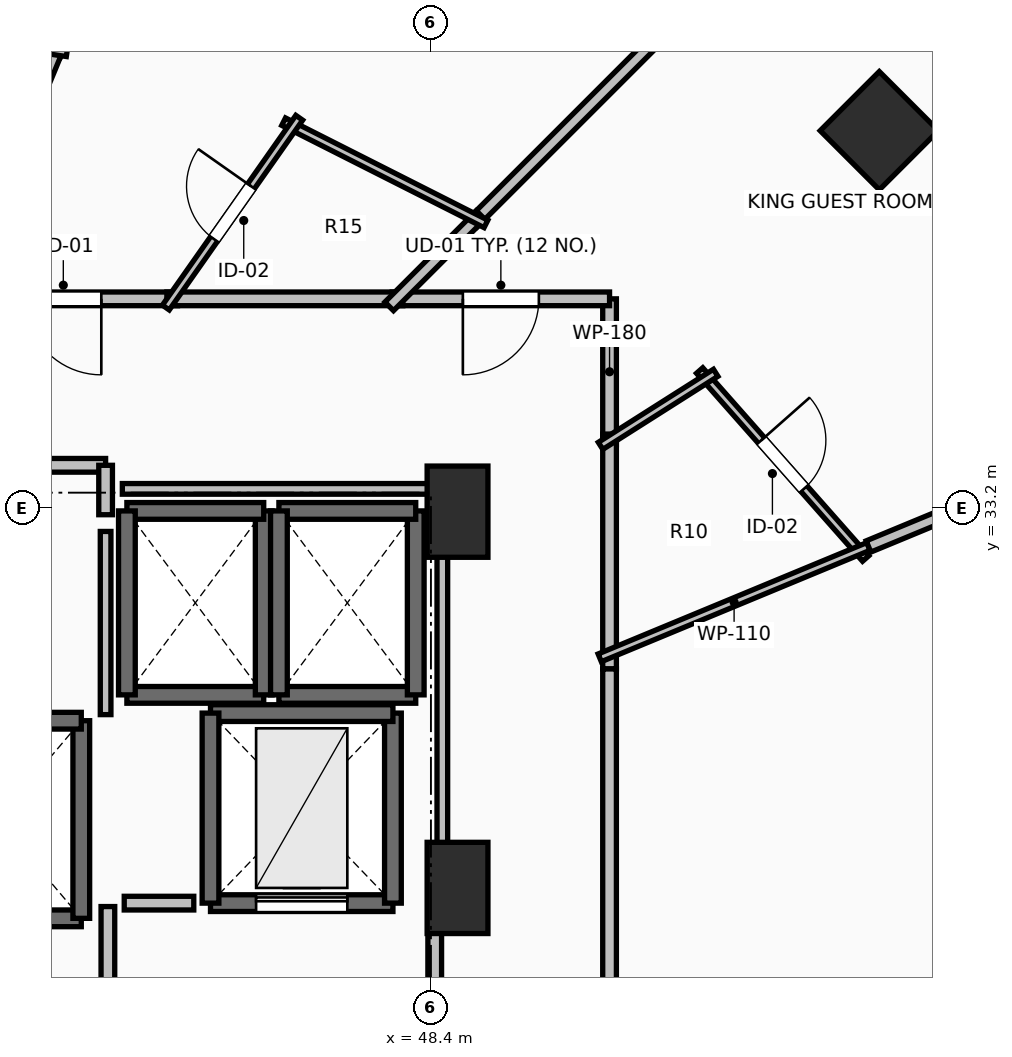
"""IFC4 building model, lengths in metres.
Left out: names, types, materials, properties, quantities, classifications, styles, units other than length and angle.
Written with IfcOpenShell. Run it as: python <this file> out.ifc"""

import sys

from ifc_helpers import new_model, si_unit, direction, frame, frame_2d, origin, origin_2d, place, context, subcontext, project, spatial, rectangle, extrude, element, fill, save


model = new_model("IFC4")
c1 = context("Model", 3, precision=1e-05, world=origin(), true_north=direction((0.0, 1.0)))
c2 = subcontext(c1, "Body", "Model", "MODEL_VIEW")
j1 = project(units=[si_unit("LENGTHUNIT", "METRE"), si_unit("PLANEANGLEUNIT", "RADIAN")], contexts=[c1])
p1 = place(None, origin())
s1 = spatial("IfcSite", under=j1, at=p1, CompositionType="ELEMENT")
p2 = place(p1, origin())
s2 = spatial("IfcBuilding", under=s1, at=p2, CompositionType="ELEMENT")
p3 = place(p2, frame((0.0, 0.0, 103.3)))
s3 = spatial("IfcBuildingStorey", under=s2, at=p3, CompositionType="ELEMENT", Elevation=103.3)
p4 = place(p3, frame((54.299, 38.162, 0.0), z_axis=(0.0, 0.0, 1.0), x_axis=(0.707106781187, 0.707106781187, 0.0)))
e1 = element("IfcColumn", 1, at=p4, inside=s3, PredefinedType="COLUMN", context=c2, shape_type="SweptSolid", body=[
    extrude(rectangle(XDim=1.1, YDim=1.1, at=origin_2d()), origin(), (0.0, 0.0, 1.0), 3.5),
])
for number, where, z_axis, x_axis in (
    (2, (48.75, 33.15, 0.0), (0.0, 0.0, 1.0), (1.0, 0.0, 0.0)),
    (3, (48.75, 28.2, 0.0), (0.0, 0.0, 1.0), (1.0, 0.0, 0.0)),
):
    element("IfcColumn", number, at=place(p3, frame(where, z_axis=z_axis, x_axis=x_axis)), inside=s3, PredefinedType="PILASTER", context=c2, shape_type="SweptSolid", body=[
        extrude(rectangle(XDim=0.8, YDim=1.2, at=origin_2d()), origin(), (0.0, 0.0, 1.0), 3.5),
    ])
p5 = place(p3, frame((41.6, 27.8, 0.0), z_axis=(0.0, 0.0, 1.0), x_axis=(1.0, 0.0, 0.0)))
e4 = element("IfcWall", 4, at=p5, inside=s3, PredefinedType="SOLIDWALL", context=c2, shape_type="SweptSolid", body=[
    extrude(rectangle(XDim=2.2, YDim=0.22, at=frame_2d((1.1, 0.0))), origin(), (0.0, 0.0, 1.0), 3.24),
])
p6 = place(p3, frame((43.8, 27.8, 0.0), z_axis=(0.0, 0.0, 1.0), x_axis=(0.0, 1.0, 0.0)))
e5 = element("IfcWall", 5, at=p6, inside=s3, PredefinedType="SOLIDWALL", context=c2, shape_type="SweptSolid", body=[
    extrude(rectangle(XDim=2.6, YDim=0.22, at=frame_2d((1.3, 0.0))), origin(), (0.0, 0.0, 1.0), 3.24),
])
p7 = place(p3, frame((43.8, 30.4, 0.0), z_axis=(0.0, 0.0, 1.0), x_axis=(-1.0, 0.0, 0.0)))
e6 = element("IfcWall", 6, at=p7, inside=s3, PredefinedType="SOLIDWALL", context=c2, shape_type="SweptSolid", body=[
    extrude(rectangle(XDim=2.2, YDim=0.22, at=frame_2d((1.1, 0.0))), origin(), (0.0, 0.0, 1.0), 3.24),
])
p8 = place(p3, frame((44.4, 30.74, 0.0), z_axis=(0.0, 0.0, 1.0), x_axis=(1.0, 0.0, 0.0)))
e7 = element("IfcWall", 7, at=p8, inside=s3, PredefinedType="SOLIDWALL", context=c2, shape_type="SweptSolid", body=[
    extrude(rectangle(XDim=1.8, YDim=0.22, at=frame_2d((0.9, 0.0))), origin(), (0.0, 0.0, 1.0), 3.24),
])
p9 = place(p3, frame((46.2, 30.74, 0.0), z_axis=(0.0, 0.0, 1.0), x_axis=(0.0, 1.0, 0.0)))
e8 = element("IfcWall", 8, at=p9, inside=s3, PredefinedType="SOLIDWALL", context=c2, shape_type="SweptSolid", body=[
    extrude(rectangle(XDim=2.42, YDim=0.22, at=frame_2d((1.21, 0.0))), origin(), (0.0, 0.0, 1.0), 3.24),
])
p10 = place(p3, frame((46.2, 33.16, 0.0), z_axis=(0.0, 0.0, 1.0), x_axis=(-1.0, 0.0, 0.0)))
e9 = element("IfcWall", 9, at=p10, inside=s3, PredefinedType="SOLIDWALL", context=c2, shape_type="SweptSolid", body=[
    extrude(rectangle(XDim=1.8, YDim=0.22, at=frame_2d((0.9, 0.0))), origin(), (0.0, 0.0, 1.0), 3.24),
])
p11 = place(p3, frame((44.4, 33.16, 0.0), z_axis=(0.0, 0.0, 1.0), x_axis=(0.0, -1.0, 0.0)))
e10 = element("IfcWall", 10, at=p11, inside=s3, PredefinedType="SOLIDWALL", context=c2, shape_type="SweptSolid", body=[
    extrude(rectangle(XDim=2.42, YDim=0.22, at=frame_2d((1.21, 0.0))), origin(), (0.0, 0.0, 1.0), 3.24),
])
p12 = place(p3, frame((46.4, 30.74, 0.0), z_axis=(0.0, 0.0, 1.0), x_axis=(1.0, 0.0, 0.0)))
e11 = element("IfcWall", 11, at=p12, inside=s3, PredefinedType="SOLIDWALL", context=c2, shape_type="SweptSolid", body=[
    extrude(rectangle(XDim=1.8, YDim=0.22, at=frame_2d((0.9, 0.0))), origin(), (0.0, 0.0, 1.0), 3.24),
])
p13 = place(p3, frame((48.2, 30.74, 0.0), z_axis=(0.0, 0.0, 1.0), x_axis=(0.0, 1.0, 0.0)))
e12 = element("IfcWall", 12, at=p13, inside=s3, PredefinedType="SOLIDWALL", context=c2, shape_type="SweptSolid", body=[
    extrude(rectangle(XDim=2.42, YDim=0.22, at=frame_2d((1.21, 0.0))), origin(), (0.0, 0.0, 1.0), 3.24),
])
p14 = place(p3, frame((48.2, 33.16, 0.0), z_axis=(0.0, 0.0, 1.0), x_axis=(-1.0, 0.0, 0.0)))
e13 = element("IfcWall", 13, at=p14, inside=s3, PredefinedType="SOLIDWALL", context=c2, shape_type="SweptSolid", body=[
    extrude(rectangle(XDim=1.8, YDim=0.22, at=frame_2d((0.9, 0.0))), origin(), (0.0, 0.0, 1.0), 3.24),
])
p15 = place(p3, frame((46.4, 33.16, 0.0), z_axis=(0.0, 0.0, 1.0), x_axis=(0.0, -1.0, 0.0)))
e14 = element("IfcWall", 14, at=p15, inside=s3, PredefinedType="SOLIDWALL", context=c2, shape_type="SweptSolid", body=[
    extrude(rectangle(XDim=2.42, YDim=0.22, at=frame_2d((1.21, 0.0))), origin(), (0.0, 0.0, 1.0), 3.24),
])
p16 = place(p3, frame((45.5, 28.0, 0.0), z_axis=(0.0, 0.0, 1.0), x_axis=(1.0, 0.0, 0.0)))
e15 = element("IfcWall", 15, at=p16, inside=s3, PredefinedType="SHEAR", context=c2, shape_type="SweptSolid", body=[
    extrude(rectangle(XDim=2.4, YDim=0.22, at=frame_2d((1.2, 0.0))), origin(), (0.0, 0.0, 1.0), 3.24),
])
p17 = place(p16, frame((0.6, 0.0, 0.0)))
e16 = element("IfcOpeningElement", 16, at=p17, cuts=e15, PredefinedType="OPENING", context=c2, shape_type="SweptSolid", body=[
    extrude(rectangle(XDim=1.2, YDim=2.2, at=frame_2d((0.6, 1.1))), frame((0.0, 0.125, 0.0), z_axis=(0.0, -1.0, 0.0), x_axis=(1.0, 0.0, 0.0)), (0.0, 0.0, 1.0), 0.25),
])
p18 = place(p3, frame((47.9, 28.0, 0.0), z_axis=(0.0, 0.0, 1.0), x_axis=(0.0, 1.0, 0.0)))
e17 = element("IfcWall", 17, at=p18, inside=s3, PredefinedType="SHEAR", context=c2, shape_type="SweptSolid", body=[
    extrude(rectangle(XDim=2.5, YDim=0.22, at=frame_2d((1.25, 0.0))), origin(), (0.0, 0.0, 1.0), 3.24),
])
p19 = place(p3, frame((47.9, 30.5, 0.0), z_axis=(0.0, 0.0, 1.0), x_axis=(-1.0, 0.0, 0.0)))
e18 = element("IfcWall", 18, at=p19, inside=s3, PredefinedType="SHEAR", context=c2, shape_type="SweptSolid", body=[
    extrude(rectangle(XDim=2.4, YDim=0.22, at=frame_2d((1.2, 0.0))), origin(), (0.0, 0.0, 1.0), 3.24),
])
p20 = place(p3, frame((45.5, 30.5, 0.0), z_axis=(0.0, 0.0, 1.0), x_axis=(0.0, -1.0, 0.0)))
e19 = element("IfcWall", 19, at=p20, inside=s3, PredefinedType="SHEAR", context=c2, shape_type="SweptSolid", body=[
    extrude(rectangle(XDim=2.5, YDim=0.22, at=frame_2d((1.25, 0.0))), origin(), (0.0, 0.0, 1.0), 3.24),
])
p21 = place(p3, frame((44.15, 27.955, 0.0), z_axis=(0.0, 0.0, 1.0), x_axis=(0.0, -1.0, 0.0)))
e20 = element("IfcWall", 20, at=p21, inside=s3, PredefinedType="PARTITIONING", context=c2, shape_type="SweptSolid", body=[
    extrude(rectangle(XDim=3.91, YDim=0.18, at=frame_2d((1.955, 0.0))), origin(), (0.0, 0.0, 1.0), 3.24),
])
p22 = place(p21, frame((1.355, 0.0, 0.0)))
e21 = element("IfcOpeningElement", 21, at=p22, cuts=e20, PredefinedType="OPENING", context=c2, shape_type="SweptSolid", body=[
    extrude(rectangle(XDim=1.2, YDim=2.15, at=frame_2d((0.6, 1.075))), frame((0.0, 0.105, 0.0), z_axis=(0.0, -1.0, 0.0), x_axis=(1.0, 0.0, 0.0)), (0.0, 0.0, 1.0), 0.21),
])
p23 = place(p3, frame((48.45, 23.95, 0.0), z_axis=(0.0, 0.0, 1.0), x_axis=(0.0, 1.0, 0.0)))
e22 = element("IfcWall", 22, at=p23, inside=s3, PredefinedType="PARTITIONING", context=c2, shape_type="SweptSolid", body=[
    extrude(rectangle(XDim=4.05, YDim=0.18, at=frame_2d((2.025, 0.0))), origin(), (0.0, 0.0, 1.0), 3.24),
])
p24 = place(p23, frame((1.425, 0.0, 0.0)))
e23 = element("IfcOpeningElement", 23, at=p24, cuts=e22, PredefinedType="OPENING", context=c2, shape_type="SweptSolid", body=[
    extrude(rectangle(XDim=1.2, YDim=2.15, at=frame_2d((0.6, 1.075))), frame((0.0, 0.105, 0.0), z_axis=(0.0, -1.0, 0.0), x_axis=(1.0, 0.0, 0.0)), (0.0, 0.0, 1.0), 0.21),
])
p25 = place(p3, frame((44.12, 33.76, 0.0), z_axis=(0.0, 0.0, 1.0), x_axis=(-1.0, 0.0, 0.0)))
e24 = element("IfcWall", 24, at=p25, inside=s3, PredefinedType="PARTITIONING", context=c2, shape_type="SweptSolid", body=[
    extrude(rectangle(XDim=2.53, YDim=0.18, at=frame_2d((1.265, 0.0))), origin(), (0.0, 0.0, 1.0), 3.24),
])
p26 = place(p25, frame((0.84, 0.0, 0.0)))
e25 = element("IfcOpeningElement", 25, at=p26, cuts=e24, PredefinedType="OPENING", context=c2, shape_type="SweptSolid", body=[
    extrude(rectangle(XDim=0.85, YDim=2.1, at=frame_2d((0.425, 1.05))), frame((0.0, 0.105, 0.0), z_axis=(0.0, -1.0, 0.0), x_axis=(1.0, 0.0, 0.0)), (0.0, 0.0, 1.0), 0.21),
])
p27 = place(p3, frame((44.12, 33.11, 0.0), z_axis=(0.0, 0.0, 1.0), x_axis=(0.0, 1.0, 0.0)))
e26 = element("IfcWall", 26, at=p27, inside=s3, PredefinedType="PARTITIONING", context=c2, shape_type="SweptSolid", body=[
    extrude(rectangle(XDim=0.65, YDim=0.18, at=frame_2d((0.325, 0.0))), origin(), (0.0, 0.0, 1.0), 3.24),
])
p28 = place(p3, frame((50.75, 34.031, 0.0), z_axis=(0.0, 0.0, 1.0), x_axis=(0.0, 1.0, 0.0)))
e27 = element("IfcWall", 27, at=p28, inside=s3, PredefinedType="PARTITIONING", context=c2, shape_type="SweptSolid", body=[
    extrude(rectangle(XDim=1.919, YDim=0.18, at=frame_2d((0.959, 0.0))), origin(), (0.0, 0.0, 1.0), 2.432),
])
p29 = place(p3, frame((50.75, 35.95, 0.0), z_axis=(0.0, 0.0, 1.0), x_axis=(-1.0, 0.0, 0.0)))
e28 = element("IfcWall", 28, at=p29, inside=s3, PredefinedType="PARTITIONING", context=c2, shape_type="SweptSolid", body=[
    extrude(rectangle(XDim=2.86, YDim=0.18, at=frame_2d((1.43, 0.0))), origin(), (0.0, 0.0, 1.0), 2.432),
])
p30 = place(p29, frame((0.93, 0.0, 0.0)))
e29 = element("IfcOpeningElement", 29, at=p30, cuts=e28, PredefinedType="OPENING", context=c2, shape_type="SweptSolid", body=[
    extrude(rectangle(XDim=1.0, YDim=2.15, at=frame_2d((0.5, 1.075))), frame((0.0, 0.105, 0.0), z_axis=(0.0, -1.0, 0.0), x_axis=(1.0, 0.0, 0.0)), (0.0, 0.0, 1.0), 0.21),
])
p31 = place(p3, frame((50.75, 31.081, 0.0), z_axis=(0.0, 0.0, 1.0), x_axis=(0.0, 1.0, 0.0)))
e30 = element("IfcWall", 30, at=p31, inside=s3, PredefinedType="PARTITIONING", context=c2, shape_type="SweptSolid", body=[
    extrude(rectangle(XDim=3.09, YDim=0.18, at=frame_2d((1.545, 0.0))), origin(), (0.0, 0.0, 1.0), 2.432),
])
p32 = place(p3, frame((45.066, 35.95, 0.0), z_axis=(0.0, 0.0, 1.0), x_axis=(-1.0, 0.0, 0.0)))
e31 = element("IfcWall", 31, at=p32, inside=s3, PredefinedType="PARTITIONING", context=c2, shape_type="SweptSolid", body=[
    extrude(rectangle(XDim=3.005, YDim=0.18, at=frame_2d((1.502, 0.0))), origin(), (0.0, 0.0, 1.0), 3.24),
])
p33 = place(p32, frame((1.002, 0.0, 0.0)))
e32 = element("IfcOpeningElement", 32, at=p33, cuts=e31, PredefinedType="OPENING", context=c2, shape_type="SweptSolid", body=[
    extrude(rectangle(XDim=1.0, YDim=2.15, at=frame_2d((0.5, 1.075))), frame((0.0, 0.105, 0.0), z_axis=(0.0, -1.0, 0.0), x_axis=(1.0, 0.0, 0.0)), (0.0, 0.0, 1.0), 0.21),
])
p34 = place(p3, frame((48.03, 35.95, 0.0), z_axis=(0.0, 0.0, 1.0), x_axis=(-1.0, 0.0, 0.0)))
e33 = element("IfcWall", 33, at=p34, inside=s3, PredefinedType="PARTITIONING", context=c2, shape_type="SweptSolid", body=[
    extrude(rectangle(XDim=3.104, YDim=0.18, at=frame_2d((1.552, 0.0))), origin(), (0.0, 0.0, 1.0), 2.432),
])
p35 = place(p3, frame((50.75, 14.1, 0.0), z_axis=(0.0, 0.0, 1.0), x_axis=(0.0, 1.0, 0.0)))
e34 = element("IfcWall", 34, at=p35, inside=s3, PredefinedType="PARTITIONING", context=c2, shape_type="SweptSolid", body=[
    extrude(rectangle(XDim=16.981, YDim=0.18, at=frame_2d((8.49, 0.0))), origin(), (0.0, 0.0, 1.0), 2.432),
])
p36 = place(p35, frame((7.99, 0.0, 0.0)))
e35 = element("IfcOpeningElement", 35, at=p36, cuts=e34, PredefinedType="OPENING", context=c2, shape_type="SweptSolid", body=[
    extrude(rectangle(XDim=1.0, YDim=2.15, at=frame_2d((0.5, 1.075))), frame((0.0, 0.105, 0.0), z_axis=(0.0, -1.0, 0.0), x_axis=(1.0, 0.0, 0.0)), (0.0, 0.0, 1.0), 0.21),
])
p37 = place(p3, frame((51.935, 35.007, 0.0), z_axis=(0.0, 0.0, 1.0), x_axis=(0.662059609276, -0.749451181709, 0.0)))
e36 = element("IfcWall", 36, at=p37, inside=s3, PredefinedType="PARTITIONING", context=c2, shape_type="SweptSolid", body=[
    extrude(rectangle(XDim=3.299, YDim=0.11, at=frame_2d((1.65, 0.0))), origin(), (0.0, 0.0, 1.0), 2.432),
])
p38 = place(p37, frame((1.225, 0.0, 0.0)))
e37 = element("IfcOpeningElement", 37, at=p38, cuts=e36, PredefinedType="OPENING", context=c2, shape_type="SweptSolid", body=[
    extrude(rectangle(XDim=0.85, YDim=2.1, at=frame_2d((0.425, 1.05))), frame((0.0, 0.07, 0.0), z_axis=(0.0, -1.0, 0.0), x_axis=(1.0, 0.0, 0.0)), (0.0, 0.0, 1.0), 0.14),
])
p39 = place(p3, frame((54.156, 32.693, 0.0), z_axis=(0.0, 0.0, 1.0), x_axis=(-0.923803754276, -0.382866326002, 0.0)))
e38 = element("IfcWall", 38, at=p39, inside=s3, PredefinedType="PARTITIONING", context=c2, shape_type="SweptSolid", body=[
    extrude(rectangle(XDim=3.827, YDim=0.11, at=frame_2d((1.914, 0.0))), origin(), (0.0, 0.0, 1.0), 2.432),
])
p40 = place(p3, frame((50.632, 34.016, 0.0), z_axis=(0.0, 0.0, 1.0), x_axis=(0.844361394482, 0.535774052665, 0.0)))
e39 = element("IfcWall", 39, at=p40, inside=s3, PredefinedType="PARTITIONING", context=c2, shape_type="SweptSolid", body=[
    extrude(rectangle(XDim=1.793, YDim=0.11, at=frame_2d((0.897, 0.0))), origin(), (0.0, 0.0, 1.0), 2.886),
])
p41 = place(p3, frame((53.768, 41.768, 0.0), z_axis=(0.0, 0.0, 1.0), x_axis=(-0.707106781187, -0.707106781187, 0.0)))
e40 = element("IfcWall", 40, at=p41, inside=s3, PredefinedType="PARTITIONING", context=c2, shape_type="SweptSolid", body=[
    extrude(rectangle(XDim=6.808, YDim=0.16, at=frame_2d((3.404, 0.0))), origin(), (0.0, 0.0, 1.0), 2.677),
])
p42 = place(p3, frame((49.053, 37.053, 0.0), z_axis=(0.0, 0.0, 1.0), x_axis=(-0.707106781187, -0.707106781187, 0.0)))
e41 = element("IfcWall", 41, at=p42, inside=s3, PredefinedType="PARTITIONING", context=c2, shape_type="SweptSolid", body=[
    extrude(rectangle(XDim=1.7, YDim=0.16, at=frame_2d((0.85, 0.0))), origin(), (0.0, 0.0, 1.0), 2.432),
])
p43 = place(p3, frame((54.156, 32.692, 0.0), z_axis=(0.0, 0.0, 1.0), x_axis=(0.923875192571, 0.38269390974, 0.0)))
e42 = element("IfcWall", 42, at=p43, inside=s3, PredefinedType="PARTITIONING", context=c2, shape_type="SweptSolid", body=[
    extrude(rectangle(XDim=7.311, YDim=0.16, at=frame_2d((3.656, 0.0))), origin(), (0.0, 0.0, 1.0), 2.432),
])
p44 = place(p3, frame((46.462, 38.281, 0.0), z_axis=(0.0, 0.0, 1.0), x_axis=(0.892486842203, -0.451073426944, 0.0)))
e43 = element("IfcWall", 43, at=p44, inside=s3, PredefinedType="PARTITIONING", context=c2, shape_type="SweptSolid", body=[
    extrude(rectangle(XDim=2.982, YDim=0.11, at=frame_2d((1.491, 0.0))), origin(), (0.0, 0.0, 1.0), 2.432),
])
p45 = place(p3, frame((44.913, 35.835, 0.0), z_axis=(0.0, 0.0, 1.0), x_axis=(0.574986040322, 0.818163219312, 0.0)))
e44 = element("IfcWall", 44, at=p45, inside=s3, PredefinedType="PARTITIONING", context=c2, shape_type="SweptSolid", body=[
    extrude(rectangle(XDim=3.052, YDim=0.11, at=frame_2d((1.526, 0.0))), origin(), (0.0, 0.0, 1.0), 2.886),
])
p46 = place(p45, frame((1.101, 0.0, 0.0)))
e45 = element("IfcOpeningElement", 45, at=p46, cuts=e44, PredefinedType="OPENING", context=c2, shape_type="SweptSolid", body=[
    extrude(rectangle(XDim=0.85, YDim=2.1, at=frame_2d((0.425, 1.05))), frame((0.0, 0.07, 0.0), z_axis=(0.0, -1.0, 0.0), x_axis=(1.0, 0.0, 0.0)), (0.0, 0.0, 1.0), 0.14),
])
p47 = place(p3, frame((45.808, 44.851, 0.0), z_axis=(0.0, 0.0, 1.0), x_axis=(-0.382705075352, -0.923870567395, 0.0)))
e46 = element("IfcWall", 46, at=p47, inside=s3, PredefinedType="PARTITIONING", context=c2, shape_type="SweptSolid", body=[
    extrude(rectangle(XDim=6.164, YDim=0.16, at=frame_2d((3.082, 0.0))), origin(), (0.0, 0.0, 1.0), 2.677),
])
p48 = place(p3, frame((43.503, 39.285, 0.0), z_axis=(0.0, 0.0, 1.0), x_axis=(-0.382733183699, -0.923858923265, 0.0)))
e47 = element("IfcWall", 47, at=p48, inside=s3, PredefinedType="PARTITIONING", context=c2, shape_type="SweptSolid", body=[
    extrude(rectangle(XDim=3.75, YDim=0.16, at=frame_2d((1.875, 0.0))), origin(), (0.0, 0.0, 1.0), 2.886),
])
p49 = place(p3, frame((40.896, 39.6, 0.0), z_axis=(0.0, 0.0, 1.0), x_axis=(0.98891024541, -0.148514398367, 0.0)))
e48 = element("IfcWall", 48, at=p49, inside=s3, PredefinedType="PARTITIONING", context=c2, shape_type="SweptSolid", body=[
    extrude(rectangle(XDim=2.745, YDim=0.11, at=frame_2d((1.373, 0.0))), origin(), (0.0, 0.0, 1.0), 2.972),
])
p50 = place(p3, frame((45.28, 28.0, 0.0), z_axis=(0.0, 0.0, 1.0), x_axis=(-1.0, 0.0, 0.0)))
e49 = element("IfcWall", 49, at=p50, inside=s3, PredefinedType="PARTITIONING", context=c2, shape_type="SweptSolid", body=[
    extrude(rectangle(XDim=0.915, YDim=0.18, at=frame_2d((0.458, 0.0))), origin(), (0.0, 0.0, 1.0), 3.24),
])
p51 = place(p3, frame((44.12, 30.48, 0.0), z_axis=(0.0, 0.0, 1.0), x_axis=(0.0, 1.0, 0.0)))
e50 = element("IfcWall", 50, at=p51, inside=s3, PredefinedType="PARTITIONING", context=c2, shape_type="SweptSolid", body=[
    extrude(rectangle(XDim=2.41, YDim=0.14, at=frame_2d((1.205, 0.0))), origin(), (0.0, 0.0, 1.0), 3.24),
])
p52 = place(p3, frame((44.34, 33.45, 0.0), z_axis=(0.0, 0.0, 1.0), x_axis=(1.0, 0.0, 0.0)))
e51 = element("IfcWall", 51, at=p52, inside=s3, PredefinedType="PARTITIONING", context=c2, shape_type="SweptSolid", body=[
    extrude(rectangle(XDim=4.21, YDim=0.14, at=frame_2d((2.105, 0.0))), origin(), (0.0, 0.0, 1.0), 2.432),
])
p53 = place(p3, frame((48.55, 33.45, 0.0), z_axis=(0.0, 0.0, 1.0), x_axis=(0.0, -1.0, 0.0)))
e52 = element("IfcWall", 52, at=p53, inside=s3, PredefinedType="PARTITIONING", context=c2, shape_type="SweptSolid", body=[
    extrude(rectangle(XDim=5.254, YDim=0.14, at=frame_2d((2.627, 0.0))), origin(), (0.0, 0.0, 1.0), 2.432),
])
p54 = place(p17, origin())
e53 = element("IfcDoor", 53, at=p54, inside=s3, OperationType="SLIDING_TO_LEFT", PredefinedType="DOOR", context=c2, shape_type="SweptSolid", body=[
    extrude(rectangle(XDim=1.2, YDim=2.2, at=frame_2d((0.6, 1.1))), frame((0.0, 0.025, 0.0), z_axis=(0.0, -1.0, 0.0), x_axis=(1.0, 0.0, 0.0)), (0.0, 0.0, 1.0), 0.05),
])
fill(e16, e53)
p55 = place(p30, origin())
e54 = element("IfcDoor", 54, at=p55, inside=s3, OperationType="SINGLE_SWING_RIGHT", PredefinedType="DOOR", context=c2, shape_type="SweptSolid", body=[
    extrude(rectangle(XDim=1.0, YDim=2.15, at=frame_2d((0.5, 1.075))), frame((0.0, 0.025, 0.0), z_axis=(0.0, -1.0, 0.0), x_axis=(1.0, 0.0, 0.0)), (0.0, 0.0, 1.0), 0.05),
])
fill(e29, e54)
p56 = place(p33, origin())
e55 = element("IfcDoor", 55, at=p56, inside=s3, OperationType="SINGLE_SWING_LEFT", PredefinedType="DOOR", context=c2, shape_type="SweptSolid", body=[
    extrude(rectangle(XDim=1.0, YDim=2.15, at=frame_2d((0.5, 1.075))), frame((0.0, 0.025, 0.0), z_axis=(0.0, -1.0, 0.0), x_axis=(1.0, 0.0, 0.0)), (0.0, 0.0, 1.0), 0.05),
])
fill(e32, e55)
p57 = place(p38, origin())
e56 = element("IfcDoor", 56, at=p57, inside=s3, OperationType="SINGLE_SWING_LEFT", PredefinedType="DOOR", context=c2, shape_type="SweptSolid", body=[
    extrude(rectangle(XDim=0.85, YDim=2.1, at=frame_2d((0.425, 1.05))), frame((0.0, 0.025, 0.0), z_axis=(0.0, -1.0, 0.0), x_axis=(1.0, 0.0, 0.0)), (0.0, 0.0, 1.0), 0.05),
])
fill(e37, e56)
p58 = place(p46, origin())
e57 = element("IfcDoor", 57, at=p58, inside=s3, OperationType="SINGLE_SWING_RIGHT", PredefinedType="DOOR", context=c2, shape_type="SweptSolid", body=[
    extrude(rectangle(XDim=0.85, YDim=2.1, at=frame_2d((0.425, 1.05))), frame((0.0, 0.025, 0.0), z_axis=(0.0, -1.0, 0.0), x_axis=(1.0, 0.0, 0.0)), (0.0, 0.0, 1.0), 0.05),
])
fill(e45, e57)
save(model, sys.argv[1])
